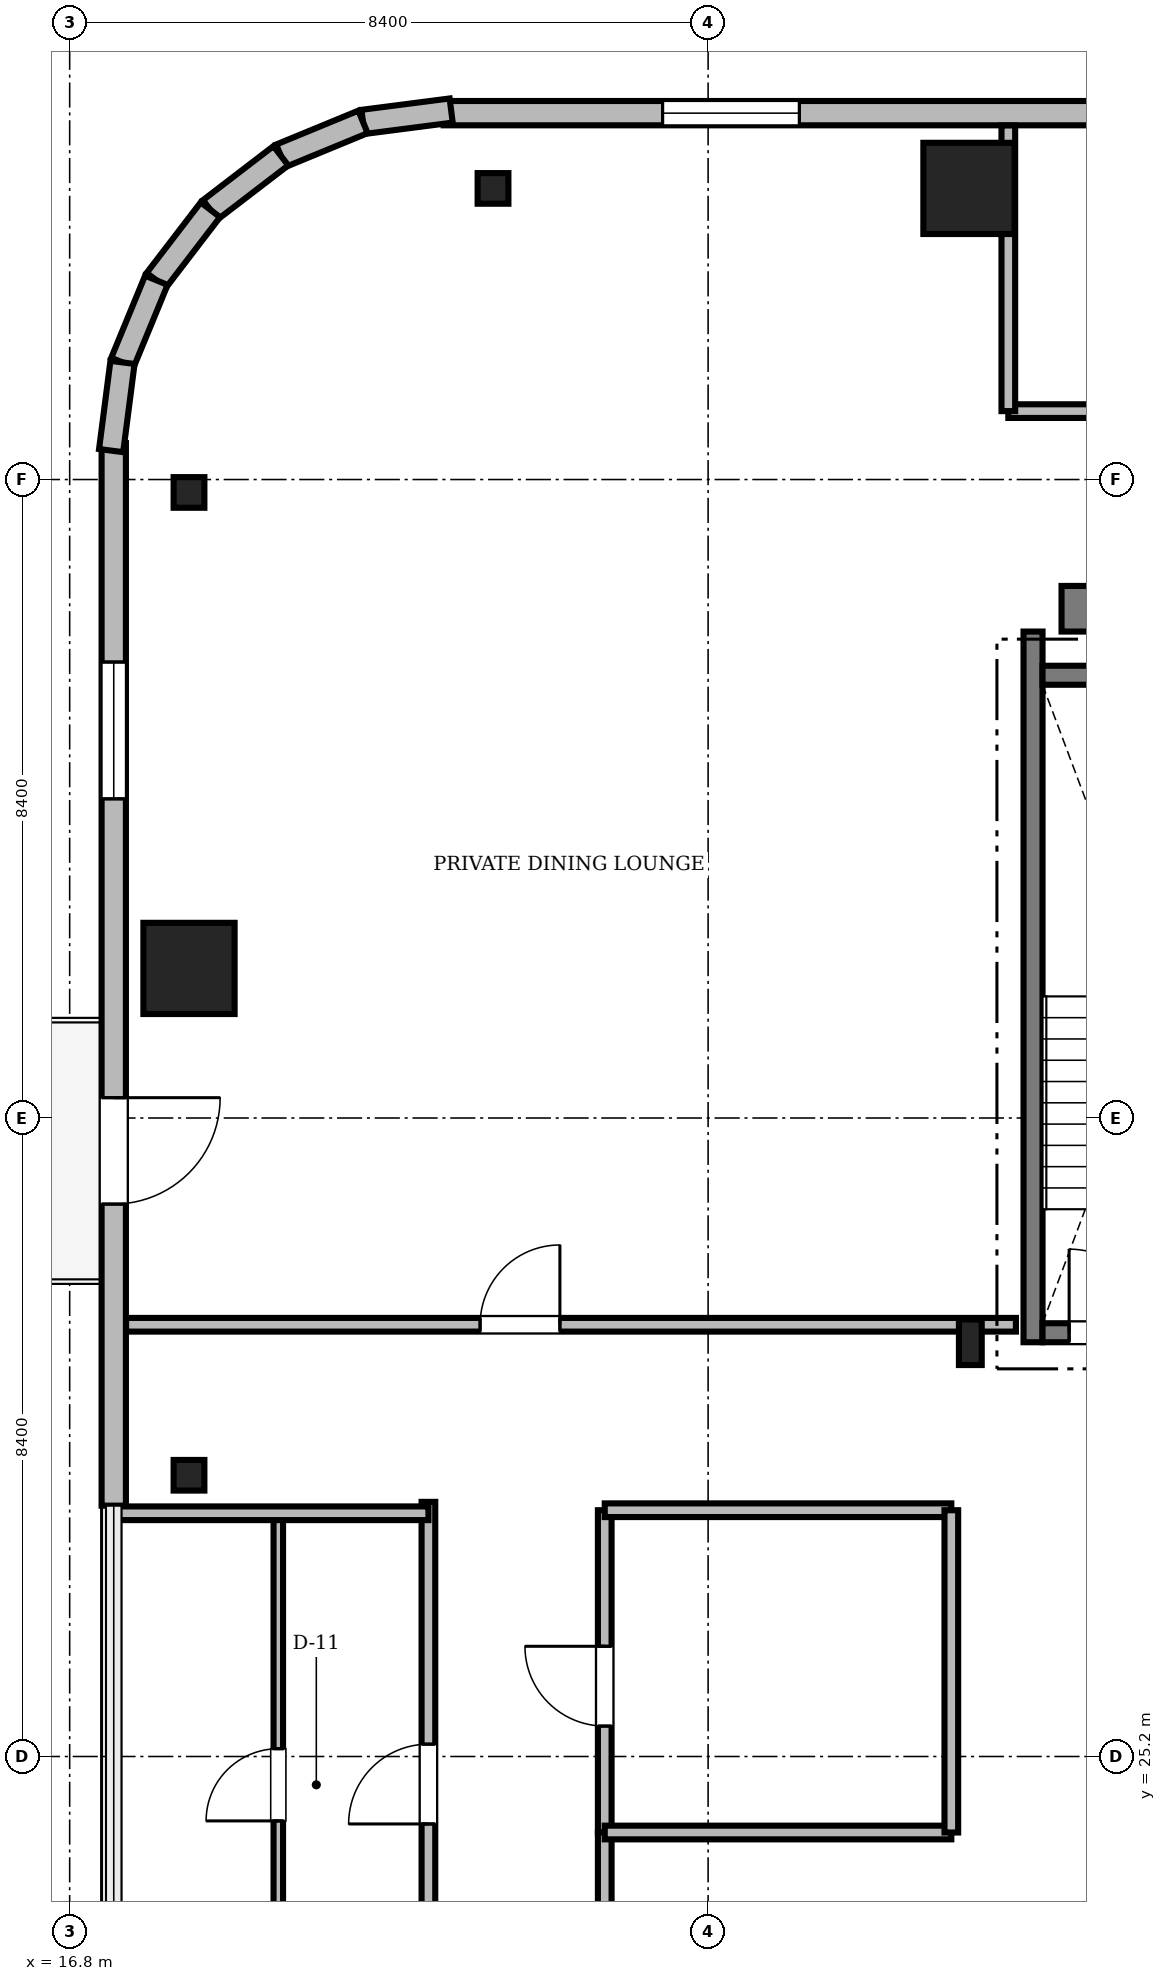
"""IFC4 building model, lengths in metres.
Left out: names, types, materials, properties, quantities, classifications, styles, units other than length and angle.
Written with IfcOpenShell. Run it as: python <this file> out.ifc"""

import sys

from ifc_helpers import new_model, si_unit, direction, frame, frame_2d, origin, origin_2d, place, context, subcontext, project, spatial, rectangle, i_section, extrude, source, transform, mapped, element, fill, save


model = new_model("IFC4")
c1 = context("Model", 3, precision=1e-05, world=origin(), true_north=direction((0.0, 1.0)))
c2 = subcontext(c1, "Body", "Model", "MODEL_VIEW")
j1 = project(units=[si_unit("LENGTHUNIT", "METRE"), si_unit("PLANEANGLEUNIT", "RADIAN")], contexts=[c1])
p1 = place(None, origin())
s1 = spatial("IfcSite", under=j1, at=p1, CompositionType="ELEMENT")
p2 = place(p1, origin())
s2 = spatial("IfcBuilding", under=s1, at=p2, CompositionType="ELEMENT")
p3 = place(p2, frame((0.0, 0.0, 266.4)))
s3 = spatial("IfcBuildingStorey", under=s2, at=p3, CompositionType="ELEMENT", Elevation=266.4)
m1 = source(origin(), c2, "Body", "SweptSolid", [
    extrude(rectangle(XDim=17.52, YDim=0.6, at=frame_2d((8.76, 0.0))), origin(), (0.0, 0.0, 1.0), 3.65),
])
p4 = place(p3, frame((29.85, 40.3, 0.0), z_axis=(0.0, 0.0, 1.0), x_axis=(1.0, 0.0, 0.0)))
e1 = element("IfcWall", 1, at=p4, inside=s3, PredefinedType="SHEAR", context=c2, shape_type="MappedRepresentation", body=[
    mapped(m1, transform((0.0, 0.0, 0.0), scale=1.0)),
])
m2 = source(origin(), c2, "Body", "SweptSolid", [
    extrude(i_section(OverallWidth=0.3, OverallDepth=0.6, WebThickness=0.015, FlangeThickness=0.03, FilletRadius=0.027, at=origin_2d()), origin(), (0.0, 0.0, 1.0), 3.65),
])
p5 = place(p3, frame((28.65, 30.65, 0.0), z_axis=(0.0, 0.0, 1.0), x_axis=(1.0, 0.0, 0.0)))
e2 = element("IfcColumn", 2, at=p5, inside=s3, PredefinedType="COLUMN", context=c2, shape_type="MappedRepresentation", body=[
    mapped(m2, transform((0.0, 0.0, 0.0), scale=1.0)),
])
m3 = source(origin(), c2, "Body", "SweptSolid", [
    extrude(rectangle(XDim=1.2, YDim=1.2, at=origin_2d()), origin(), (0.0, 0.0, 1.0), 3.702),
])
p6 = place(p3, frame((28.632, 45.83, 0.0), z_axis=(0.080983660509, -0.145876105086, 0.985982661458), x_axis=(0.874306388121, 0.485374432465, 0.0)))
e3 = element("IfcColumn", 3, at=p6, inside=s3, PredefinedType="COLUMN", context=c2, shape_type="MappedRepresentation", body=[
    mapped(m3, transform((0.0, 0.0, 0.0), scale=1.0)),
])
m4 = source(origin(), c2, "Body", "SweptSolid", [
    extrude(rectangle(XDim=1.2, YDim=1.2, at=origin_2d()), origin(), (0.0, 0.0, 1.0), 3.702),
])
p7 = place(p3, frame((18.37, 35.568, 0.0), z_axis=(0.145810780845, -0.081049954617, 0.985986876711), x_axis=(0.485844306078, 0.87404537082, 0.0)))
e4 = element("IfcColumn", 4, at=p7, inside=s3, PredefinedType="COLUMN", context=c2, shape_type="MappedRepresentation", body=[
    mapped(m4, transform((0.0, 0.0, 0.0), scale=1.0)),
])
m5 = source(origin(), c2, "Body", "SweptSolid", [
    extrude(i_section(OverallWidth=0.405, OverallDepth=0.403, WebThickness=0.018, FlangeThickness=0.028, FilletRadius=0.015, at=origin_2d()), origin(), (0.0, 0.0, 1.0), 3.724),
])
for number, where, z_axis, x_axis in (
    (5, (22.37, 45.83, 0.0), (0.134, -0.145, 0.98), (0.734, 0.679, 0.0)),
    (6, (18.37, 41.83, 0.0), (0.145, -0.134, 0.98), (0.68, 0.734, 0.0)),
):
    element("IfcColumn", number, at=place(p3, frame(where, z_axis=z_axis, x_axis=x_axis)), inside=s3, PredefinedType="COLUMN", context=c2, shape_type="MappedRepresentation", body=[
        mapped(m5, transform((0.0, 0.0, 0.0), scale=1.0)),
    ])
m6 = source(origin(), c2, "Body", "SweptSolid", [
    extrude(i_section(OverallWidth=0.405, OverallDepth=0.403, WebThickness=0.018, FlangeThickness=0.028, FilletRadius=0.015, at=origin_2d()), origin(), (0.0, 0.0, 1.0), 3.69),
])
p8 = place(p3, frame((18.37, 28.9, 0.0), z_axis=(0.146292075848, 0.0, 0.989241440976), x_axis=(0.0, 1.0, 0.0)))
e7 = element("IfcColumn", 7, at=p8, inside=s3, PredefinedType="COLUMN", context=c2, shape_type="MappedRepresentation", body=[
    mapped(m6, transform((0.0, 0.0, 0.0), scale=1.0)),
])
m7 = source(origin(), c2, "Body", "SweptSolid", [
    extrude(rectangle(XDim=13.98, YDim=0.32, at=frame_2d((6.99, 0.0))), origin(), (0.0, 0.0, 1.0), 3.65),
])
p9 = place(p3, frame((35.7, 46.82, 0.0), z_axis=(0.0, 0.0, 1.0), x_axis=(-1.0, 0.0, 0.0)))
e8 = element("IfcWall", 8, at=p9, inside=s3, PredefinedType="SOLIDWALL", context=c2, shape_type="MappedRepresentation", body=[
    mapped(m7, transform((0.0, 0.0, 0.0), scale=1.0)),
])
m8 = source(origin(), c2, "Body", "SweptSolid", [
    extrude(rectangle(XDim=1.8, YDim=2.4, at=frame_2d((0.9, 1.2))), frame((0.0, 0.17, 0.0), z_axis=(0.0, -1.0, 0.0), x_axis=(1.0, 0.0, 0.0)), (0.0, 0.0, 1.0), 0.34),
])
p10 = place(p9, frame((9.299, 0.0, 0.72)))
e9 = element("IfcOpeningElement", 9, at=p10, cuts=e8, PredefinedType="OPENING", context=c2, shape_type="MappedRepresentation", body=[
    mapped(m8, transform((0.0, 0.0, 0.0), scale=1.0)),
])
p11 = place(p3, frame((17.38, 42.48, 0.0), z_axis=(0.0, 0.0, 1.0), x_axis=(0.0, -1.0, 0.0)))
e10 = element("IfcWall", 10, at=p11, inside=s3, PredefinedType="SOLIDWALL", context=c2, shape_type="MappedRepresentation", body=[
    mapped(m7, transform((0.0, 0.0, 0.0), scale=1.0)),
])
m9 = source(origin(), c2, "Body", "SweptSolid", [
    extrude(rectangle(XDim=1.4, YDim=2.3, at=frame_2d((0.7, 1.15))), frame((0.0, 0.17, 0.0), z_axis=(0.0, -1.0, 0.0), x_axis=(1.0, 0.0, 0.0)), (0.0, 0.0, 1.0), 0.34),
])
p12 = place(p11, frame((8.613, 0.0, 0.0)))
e11 = element("IfcOpeningElement", 11, at=p12, cuts=e10, PredefinedType="OPENING", context=c2, shape_type="MappedRepresentation", body=[
    mapped(m9, transform((0.0, 0.0, 0.0), scale=1.0)),
])
p13 = place(p11, frame((2.881, 0.0, 0.72)))
e12 = element("IfcOpeningElement", 12, at=p13, cuts=e10, PredefinedType="OPENING", context=c2, shape_type="MappedRepresentation", body=[
    mapped(m8, transform((0.0, 0.0, 0.0), scale=1.0)),
])
m10 = source(origin(), c2, "Body", "SweptSolid", [
    extrude(rectangle(XDim=1.17, YDim=0.32, at=frame_2d((0.585, 0.0))), origin(), (0.0, 0.0, 1.0), 3.65),
])
p14 = place(p3, frame((21.819, 46.855, 0.0), z_axis=(0.0, 0.0, 1.0), x_axis=(-0.99175563563, -0.128143510159, 0.0)))
e13 = element("IfcWall", 13, at=p14, inside=s3, PredefinedType="SOLIDWALL", context=c2, shape_type="MappedRepresentation", body=[
    mapped(m10, transform((0.0, 0.0, 0.0), scale=1.0)),
])
m11 = source(origin(), c2, "Body", "SweptSolid", [
    extrude(rectangle(XDim=1.169, YDim=0.32, at=frame_2d((0.584, 0.0))), origin(), (0.0, 0.0, 1.0), 3.65),
])
p15 = place(p3, frame((20.659, 46.705, 0.0), z_axis=(0.0, 0.0, 1.0), x_axis=(-0.924595894808, -0.380949381552, 0.0)))
e14 = element("IfcWall", 14, at=p15, inside=s3, PredefinedType="SOLIDWALL", context=c2, shape_type="MappedRepresentation", body=[
    mapped(m11, transform((0.0, 0.0, 0.0), scale=1.0)),
])
m12 = source(origin(), c2, "Body", "SweptSolid", [
    extrude(rectangle(XDim=1.168, YDim=0.32, at=frame_2d((0.584, 0.0))), origin(), (0.0, 0.0, 1.0), 3.65),
])
for number, where, z_axis, x_axis in (
    (15, (19.578, 46.26, 0.0), (0.0, 0.0, 1.0), (-0.794, -0.608, 0.0)),
    (16, (18.651, 45.549, 0.0), (0.0, 0.0, 1.0), (-0.608, -0.794, 0.0)),
):
    element("IfcWall", number, at=place(p3, frame(where, z_axis=z_axis, x_axis=x_axis)), inside=s3, PredefinedType="SOLIDWALL", context=c2, shape_type="MappedRepresentation", body=[
        mapped(m12, transform((0.0, 0.0, 0.0), scale=1.0)),
    ])
p16 = place(p3, frame((17.94, 44.622, 0.0), z_axis=(0.0, 0.0, 1.0), x_axis=(-0.380949381552, -0.924595894808, 0.0)))
e17 = element("IfcWall", 17, at=p16, inside=s3, PredefinedType="SOLIDWALL", context=c2, shape_type="MappedRepresentation", body=[
    mapped(m11, transform((0.0, 0.0, 0.0), scale=1.0)),
])
m13 = source(origin(), c2, "Body", "SweptSolid", [
    extrude(rectangle(XDim=1.17, YDim=0.32, at=frame_2d((0.585, 0.0))), origin(), (0.0, 0.0, 1.0), 3.65),
])
p17 = place(p3, frame((17.495, 43.541, 0.0), z_axis=(0.0, 0.0, 1.0), x_axis=(-0.127938226201, -0.991782138515, 0.0)))
e18 = element("IfcWall", 18, at=p17, inside=s3, PredefinedType="SOLIDWALL", context=c2, shape_type="MappedRepresentation", body=[
    mapped(m13, transform((0.0, 0.0, 0.0), scale=1.0)),
])
m14 = source(origin(), c2, "Body", "SweptSolid", [
    extrude(rectangle(XDim=9.35, YDim=0.25, at=frame_2d((4.675, 0.0))), origin(), (0.0, 0.0, 1.0), 3.75),
])
p18 = place(p3, frame((29.475, 30.65, 0.0), z_axis=(0.0, 0.0, 1.0), x_axis=(0.0, 1.0, 0.0)))
e19 = element("IfcWall", 19, at=p18, inside=s3, PredefinedType="SOLIDWALL", context=c2, shape_type="MappedRepresentation", body=[
    mapped(m14, transform((0.0, 0.0, 0.0), scale=1.0)),
])
m15 = source(origin(), c2, "Body", "SweptSolid", [
    extrude(rectangle(XDim=3.15, YDim=0.25, at=frame_2d((1.575, 0.0))), origin(), (0.0, 0.0, 1.0), 3.75),
])
p19 = place(p3, frame((29.6, 39.425, 0.0), z_axis=(0.0, 0.0, 1.0), x_axis=(1.0, 0.0, 0.0)))
e20 = element("IfcWall", 20, at=p19, inside=s3, PredefinedType="SOLIDWALL", context=c2, shape_type="MappedRepresentation", body=[
    mapped(m15, transform((0.0, 0.0, 0.0), scale=1.0)),
])
p20 = place(p3, frame((29.6, 30.775, 0.0), z_axis=(0.0, 0.0, 1.0), x_axis=(1.0, 0.0, 0.0)))
e21 = element("IfcWall", 21, at=p20, inside=s3, PredefinedType="SOLIDWALL", context=c2, shape_type="MappedRepresentation", body=[
    mapped(m15, transform((0.0, 0.0, 0.0), scale=1.0)),
])
m16 = source(origin(), c2, "Body", "SweptSolid", [
    extrude(rectangle(XDim=1.1, YDim=2.2, at=frame_2d((0.55, 1.1))), frame((0.0, 0.135, 0.0), z_axis=(0.0, -1.0, 0.0), x_axis=(1.0, 0.0, 0.0)), (0.0, 0.0, 1.0), 0.27),
])
p21 = place(p20, frame((0.35, 0.0, 0.0)))
e22 = element("IfcOpeningElement", 22, at=p21, cuts=e21, PredefinedType="OPENING", context=c2, shape_type="MappedRepresentation", body=[
    mapped(m16, transform((0.0, 0.0, 0.0), scale=1.0)),
])
m17 = source(origin(), c2, "Body", "SweptSolid", [
    extrude(rectangle(XDim=31.274, YDim=0.18, at=frame_2d((15.637, 0.0))), origin(), (0.0, 0.0, 1.0), 2.892),
])
p22 = place(p3, frame((29.15, 42.9, 0.0), z_axis=(0.0, 0.0, 1.0), x_axis=(1.0, 0.0, 0.0)))
e23 = element("IfcWall", 23, at=p22, inside=s3, PredefinedType="PARTITIONING", context=c2, shape_type="MappedRepresentation", body=[
    mapped(m17, transform((0.0, 0.0, 0.0), scale=1.0)),
])
m18 = source(origin(), c2, "Body", "SweptSolid", [
    extrude(rectangle(XDim=1.05, YDim=2.2, at=frame_2d((0.525, 1.1))), frame((0.0, 0.1, 0.0), z_axis=(0.0, -1.0, 0.0), x_axis=(1.0, 0.0, 0.0)), (0.0, 0.0, 1.0), 0.2),
])
p23 = place(p22, frame((4.5, 0.0, 0.0)))
e24 = element("IfcOpeningElement", 24, at=p23, cuts=e23, PredefinedType="OPENING", context=c2, shape_type="MappedRepresentation", body=[
    mapped(m18, transform((0.0, 0.0, 0.0), scale=1.0)),
])
m19 = source(origin(), c2, "Body", "SweptSolid", [
    extrude(rectangle(XDim=14.42, YDim=0.18, at=frame_2d((7.21, 0.0))), origin(), (0.0, 0.0, 1.0), 3.092),
])
p24 = place(p3, frame((21.52, 14.13, 0.0), z_axis=(0.0, 0.0, 1.0), x_axis=(0.0, 1.0, 0.0)))
e25 = element("IfcWall", 25, at=p24, inside=s3, PredefinedType="PARTITIONING", context=c2, shape_type="MappedRepresentation", body=[
    mapped(m19, transform((0.0, 0.0, 0.0), scale=1.0)),
])
p25 = place(p24, frame((3.048, 0.0, 0.0)))
e26 = element("IfcOpeningElement", 26, at=p25, cuts=e25, PredefinedType="OPENING", context=c2, shape_type="MappedRepresentation", body=[
    mapped(m18, transform((0.0, 0.0, 0.0), scale=1.0)),
])
p26 = place(p24, frame((10.183, 0.0, 0.0)))
e27 = element("IfcOpeningElement", 27, at=p26, cuts=e25, PredefinedType="OPENING", context=c2, shape_type="MappedRepresentation", body=[
    mapped(m18, transform((0.0, 0.0, 0.0), scale=1.0)),
])
m20 = source(origin(), c2, "Body", "SweptSolid", [
    extrude(rectangle(XDim=11.708, YDim=0.18, at=frame_2d((5.854, 0.0))), origin(), (0.0, 0.0, 1.0), 2.892),
])
p27 = place(p3, frame((17.542, 30.88, 0.0), z_axis=(0.0, 0.0, 1.0), x_axis=(1.0, 0.0, 0.0)))
e28 = element("IfcWall", 28, at=p27, inside=s3, PredefinedType="PARTITIONING", context=c2, shape_type="MappedRepresentation", body=[
    mapped(m20, transform((0.0, 0.0, 0.0), scale=1.0)),
])
p28 = place(p27, frame((4.658, 0.0, 0.0)))
e29 = element("IfcOpeningElement", 29, at=p28, cuts=e28, PredefinedType="OPENING", context=c2, shape_type="MappedRepresentation", body=[
    mapped(m18, transform((0.0, 0.0, 0.0), scale=1.0)),
])
m21 = source(origin(), c2, "Body", "SweptSolid", [
    extrude(rectangle(XDim=7.135, YDim=0.125, at=frame_2d((3.567, 0.0))), origin(), (0.0, 0.0, 1.0), 3.342),
])
p29 = place(p3, frame((19.545, 21.265, 0.0), z_axis=(0.0, 0.0, 1.0), x_axis=(0.0, 1.0, 0.0)))
e30 = element("IfcWall", 30, at=p29, inside=s3, PredefinedType="PARTITIONING", context=c2, shape_type="MappedRepresentation", body=[
    mapped(m21, transform((0.0, 0.0, 0.0), scale=1.0)),
])
m22 = source(origin(), c2, "Body", "SweptSolid", [
    extrude(rectangle(XDim=0.95, YDim=2.15, at=frame_2d((0.475, 1.075))), frame((0.0, 0.073, 0.0), z_axis=(0.0, -1.0, 0.0), x_axis=(1.0, 0.0, 0.0)), (0.0, 0.0, 1.0), 0.145),
])
p30 = place(p29, frame((3.087, 0.0, 0.0)))
e31 = element("IfcOpeningElement", 31, at=p30, cuts=e30, PredefinedType="OPENING", context=c2, shape_type="MappedRepresentation", body=[
    mapped(m22, transform((0.0, 0.0, 0.0), scale=1.0)),
])
m23 = source(origin(), c2, "Body", "SweptSolid", [
    extrude(rectangle(XDim=4.24, YDim=0.18, at=frame_2d((2.12, 0.0))), origin(), (0.0, 0.0, 1.0), 3.092),
])
p31 = place(p3, frame((23.84, 24.2, 0.0), z_axis=(0.0, 0.0, 1.0), x_axis=(0.0, 1.0, 0.0)))
e32 = element("IfcWall", 32, at=p31, inside=s3, PredefinedType="PARTITIONING", context=c2, shape_type="MappedRepresentation", body=[
    mapped(m23, transform((0.0, 0.0, 0.0), scale=1.0)),
])
p32 = place(p31, frame((1.4, 0.0, 0.0)))
e33 = element("IfcOpeningElement", 33, at=p32, cuts=e32, PredefinedType="OPENING", context=c2, shape_type="MappedRepresentation", body=[
    mapped(m18, transform((0.0, 0.0, 0.0), scale=1.0)),
])
m24 = source(origin(), c2, "Body", "SweptSolid", [
    extrude(rectangle(XDim=4.15, YDim=0.18, at=frame_2d((2.075, 0.0))), origin(), (0.0, 0.0, 1.0), 3.342),
])
p33 = place(p3, frame((23.84, 20.05, 0.0), z_axis=(0.0, 0.0, 1.0), x_axis=(0.0, 1.0, 0.0)))
e34 = element("IfcWall", 34, at=p33, inside=s3, PredefinedType="PARTITIONING", context=c2, shape_type="MappedRepresentation", body=[
    mapped(m24, transform((0.0, 0.0, 0.0), scale=1.0)),
])
p34 = place(p33, frame((1.4, 0.0, 0.0)))
e35 = element("IfcOpeningElement", 35, at=p34, cuts=e34, PredefinedType="OPENING", context=c2, shape_type="MappedRepresentation", body=[
    mapped(m18, transform((0.0, 0.0, 0.0), scale=1.0)),
])
m25 = source(origin(), c2, "Body", "SweptSolid", [
    extrude(rectangle(XDim=4.56, YDim=0.18, at=frame_2d((2.28, 0.0))), origin(), (0.0, 0.0, 1.0), 3.65),
])
for number, where, z_axis, x_axis in (
    (36, (23.84, 24.2, 0.0), (0.0, 0.0, 1.0), (1.0, 0.0, 0.0)),
    (37, (23.84, 28.44, 0.0), (0.0, 0.0, 1.0), (1.0, 0.0, 0.0)),
):
    element("IfcWall", number, at=place(p3, frame(where, z_axis=z_axis, x_axis=x_axis)), inside=s3, PredefinedType="PARTITIONING", context=c2, shape_type="MappedRepresentation", body=[
        mapped(m25, transform((0.0, 0.0, 0.0), scale=1.0)),
    ])
p35 = place(p3, frame((28.4, 24.2, 0.0), z_axis=(0.0, 0.0, 1.0), x_axis=(0.0, 1.0, 0.0)))
e38 = element("IfcWall", 38, at=p35, inside=s3, PredefinedType="PARTITIONING", context=c2, shape_type="MappedRepresentation", body=[
    mapped(m23, transform((0.0, 0.0, 0.0), scale=1.0)),
])
m26 = source(origin(), c2, "Body", "SweptSolid", [
    extrude(rectangle(XDim=4.17, YDim=0.18, at=frame_2d((2.085, 0.0))), origin(), (0.0, 0.0, 1.0), 2.892),
])
p36 = place(p3, frame((17.35, 28.4, 0.0), z_axis=(0.0, 0.0, 1.0), x_axis=(1.0, 0.0, 0.0)))
e39 = element("IfcWall", 39, at=p36, inside=s3, PredefinedType="PARTITIONING", context=c2, shape_type="MappedRepresentation", body=[
    mapped(m26, transform((0.0, 0.0, 0.0), scale=1.0)),
])
m27 = source(origin(), c2, "Body", "SweptSolid", [
    extrude(rectangle(XDim=3.758, YDim=0.18, at=frame_2d((1.879, 0.0))), origin(), (0.0, 0.0, 1.0), 2.892),
])
p37 = place(p3, frame((29.15, 42.9, 0.0), z_axis=(0.0, 0.0, 1.0), x_axis=(0.0, 1.0, 0.0)))
e40 = element("IfcWall", 40, at=p37, inside=s3, PredefinedType="PARTITIONING", context=c2, shape_type="MappedRepresentation", body=[
    mapped(m27, transform((0.0, 0.0, 0.0), scale=1.0)),
])
m28 = source(origin(), c2, "Body", "SweptSolid", [
    extrude(rectangle(XDim=1.8, YDim=2.4, at=frame_2d((0.9, 1.2))), frame((0.0, 0.03, 0.0), z_axis=(0.0, -1.0, 0.0), x_axis=(1.0, 0.0, 0.0)), (0.0, 0.0, 1.0), 0.06),
])
p38 = place(p10, origin())
e41 = element("IfcWindow", 41, at=p38, inside=s3, PartitioningType="SINGLE_PANEL", PredefinedType="WINDOW", context=c2, shape_type="MappedRepresentation", body=[
    mapped(m28, transform((0.0, 0.0, 0.0), scale=1.0)),
])
fill(e9, e41)
m29 = source(origin(), c2, "Body", "SweptSolid", [
    extrude(rectangle(XDim=1.4, YDim=2.3, at=frame_2d((0.7, 1.15))), frame((0.0, 0.025, 0.0), z_axis=(0.0, -1.0, 0.0), x_axis=(1.0, 0.0, 0.0)), (0.0, 0.0, 1.0), 0.05),
])
p39 = place(p12, frame((1.4, 0.0, 0.0), z_axis=(0.0, 0.0, 1.0), x_axis=(-1.0, 0.0, 0.0)))
e42 = element("IfcDoor", 42, at=p39, inside=s3, OperationType="DOUBLE_DOOR_SLIDING", PredefinedType="DOOR", context=c2, shape_type="MappedRepresentation", body=[
    mapped(m29, transform((0.0, 0.0, 0.0), scale=1.0)),
])
fill(e11, e42)
p40 = place(p13, origin())
e43 = element("IfcWindow", 43, at=p40, inside=s3, PartitioningType="SINGLE_PANEL", PredefinedType="WINDOW", context=c2, shape_type="MappedRepresentation", body=[
    mapped(m28, transform((0.0, 0.0, 0.0), scale=1.0)),
])
fill(e12, e43)
m30 = source(origin(), c2, "Body", "SweptSolid", [
    extrude(rectangle(XDim=1.1, YDim=2.2, at=frame_2d((0.55, 1.1))), frame((0.0, 0.025, 0.0), z_axis=(0.0, -1.0, 0.0), x_axis=(1.0, 0.0, 0.0)), (0.0, 0.0, 1.0), 0.05),
])
p41 = place(p21, origin())
e44 = element("IfcDoor", 44, at=p41, inside=s3, OperationType="SINGLE_SWING_LEFT", PredefinedType="DOOR", context=c2, shape_type="MappedRepresentation", body=[
    mapped(m30, transform((0.0, 0.0, 0.0), scale=1.0)),
])
fill(e22, e44)
m31 = source(origin(), c2, "Body", "SweptSolid", [
    extrude(rectangle(XDim=1.05, YDim=2.2, at=frame_2d((0.525, 1.1))), frame((0.0, 0.025, 0.0), z_axis=(0.0, -1.0, 0.0), x_axis=(1.0, 0.0, 0.0)), (0.0, 0.0, 1.0), 0.05),
])
p42 = place(p26, origin())
e45 = element("IfcDoor", 45, at=p42, inside=s3, OperationType="SINGLE_SWING_LEFT", PredefinedType="DOOR", context=c2, shape_type="MappedRepresentation", body=[
    mapped(m31, transform((0.0, 0.0, 0.0), scale=1.0)),
])
fill(e27, e45)
p43 = place(p28, origin())
e46 = element("IfcDoor", 46, at=p43, inside=s3, OperationType="SINGLE_SWING_RIGHT", PredefinedType="DOOR", context=c2, shape_type="MappedRepresentation", body=[
    mapped(m31, transform((0.0, 0.0, 0.0), scale=1.0)),
])
fill(e29, e46)
m32 = source(origin(), c2, "Body", "SweptSolid", [
    extrude(rectangle(XDim=0.95, YDim=2.15, at=frame_2d((0.475, 1.075))), frame((0.0, 0.025, 0.0), z_axis=(0.0, -1.0, 0.0), x_axis=(1.0, 0.0, 0.0)), (0.0, 0.0, 1.0), 0.05),
])
p44 = place(p30, origin())
e47 = element("IfcDoor", 47, at=p44, inside=s3, OperationType="SINGLE_SWING_LEFT", PredefinedType="DOOR", context=c2, shape_type="MappedRepresentation", body=[
    mapped(m32, transform((0.0, 0.0, 0.0), scale=1.0)),
])
fill(e31, e47)
p45 = place(p32, origin())
e48 = element("IfcDoor", 48, at=p45, inside=s3, OperationType="SINGLE_SWING_RIGHT", PredefinedType="DOOR", context=c2, shape_type="MappedRepresentation", body=[
    mapped(m31, transform((0.0, 0.0, 0.0), scale=1.0)),
])
fill(e33, e48)
save(model, sys.argv[1])
